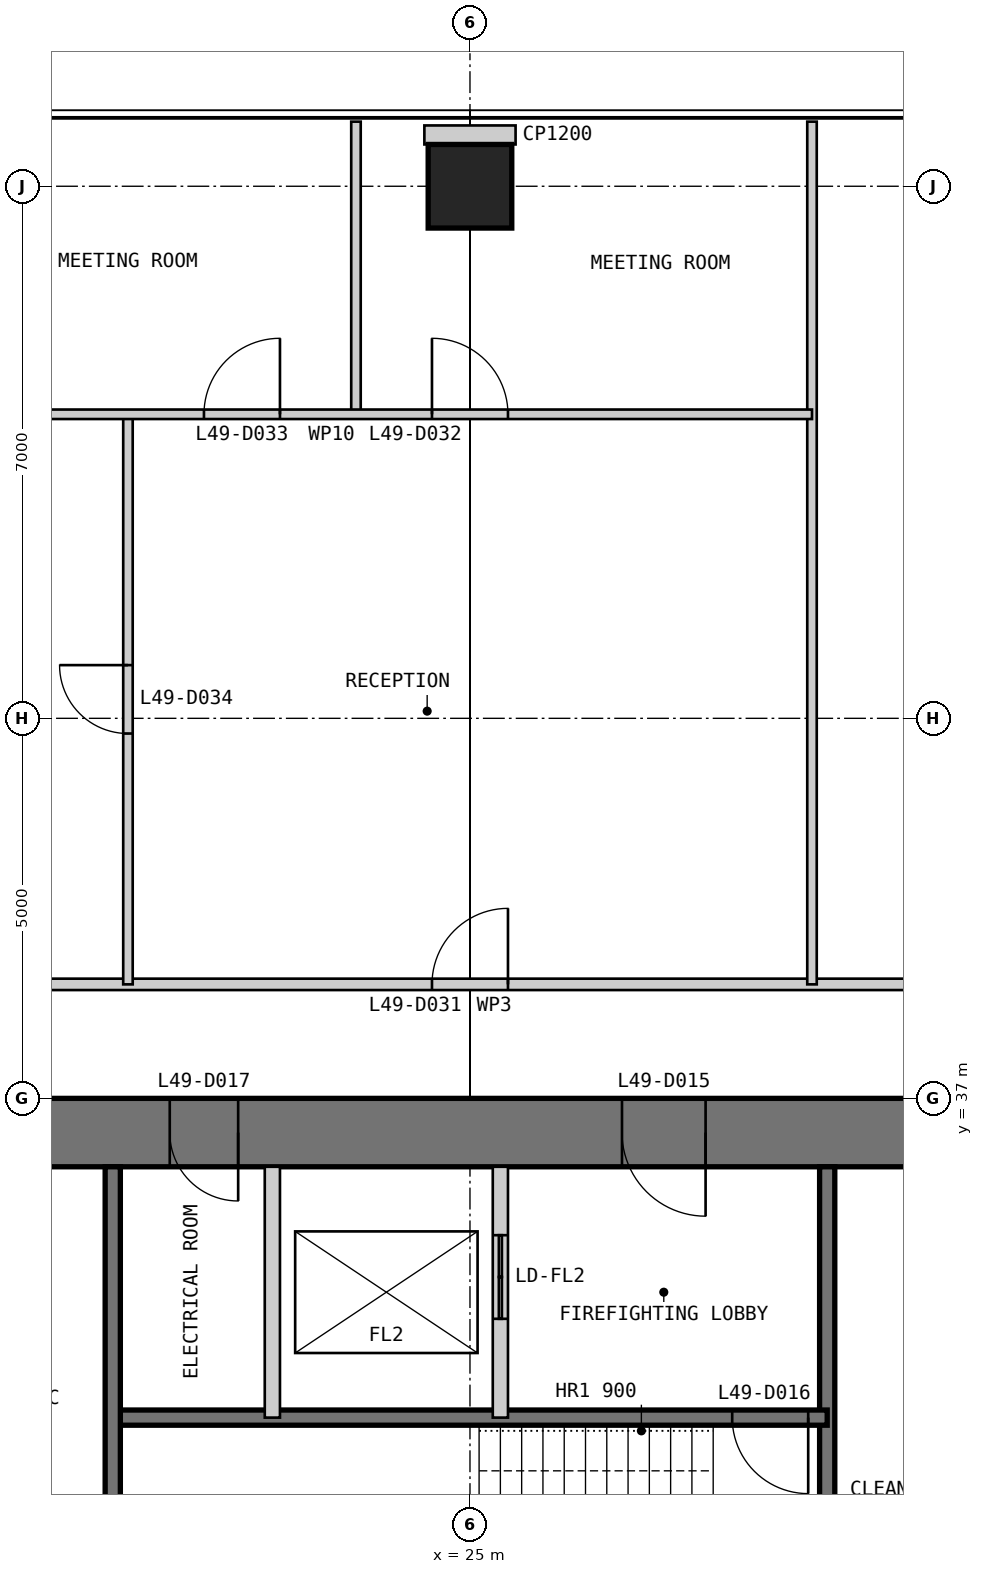
"""IFC4 building model, lengths in metres.
Left out: names, types, materials, properties, quantities, classifications, styles, units other than length and angle.
Written with IfcOpenShell. Run it as: python <this file> out.ifc"""

import sys

from ifc_helpers import new_model, si_unit, direction, frame, frame_2d, origin, origin_2d, place, context, subcontext, project, spatial, polyline, rectangle, outline, extrude, element, fill, save


model = new_model("IFC4")
c1 = context("Model", 3, precision=1e-05, world=origin(), true_north=direction((0.0, 1.0)))
c2 = subcontext(c1, "Body", "Model", "MODEL_VIEW")
j1 = project(units=[si_unit("LENGTHUNIT", "METRE"), si_unit("PLANEANGLEUNIT", "RADIAN")], contexts=[c1])
p1 = place(None, origin())
s1 = spatial("IfcSite", under=j1, at=p1, CompositionType="ELEMENT")
p2 = place(p1, origin())
s2 = spatial("IfcBuilding", under=s1, at=p2, CompositionType="ELEMENT")
p3 = place(p2, frame((0.0, 0.0, 209.8)))
s3 = spatial("IfcBuildingStorey", under=s2, at=p3, CompositionType="ELEMENT", Elevation=209.8)
p4 = place(p3, frame((25.0, 49.0, 0.0), z_axis=(0.0, 0.0, 1.0), x_axis=(1.0, 0.0, 0.0)))
e1 = element("IfcColumn", 1, at=p4, inside=s3, PredefinedType="COLUMN", context=c2, shape_type="SweptSolid", body=[
    extrude(rectangle(XDim=1.1, YDim=1.1, at=origin_2d()), origin(), (0.0, 0.0, 1.0), 4.0),
])
p5 = place(p3, frame((37.0, 36.55, 0.0), z_axis=(0.0, 0.0, 1.0), x_axis=(-1.0, 0.0, 0.0)))
e2 = element("IfcWall", 2, at=p5, inside=s3, PredefinedType="SHEAR", context=c2, shape_type="SweptSolid", body=[
    extrude(outline(polyline([(0.0, -0.45), (24.0, -0.45), (23.1, 0.45), (0.9, 0.45), (0.0, -0.45)])), origin(), (0.0, 0.0, 1.0), 4.0),
])
p6 = place(p5, frame((4.9, 0.0, 0.0)))
e3 = element("IfcOpeningElement", 3, at=p6, cuts=e2, PredefinedType="OPENING", context=c2, shape_type="SweptSolid", body=[
    extrude(rectangle(XDim=1.0, YDim=2.2, at=frame_2d((0.5, 1.1))), frame((0.0, 0.46, 0.0), z_axis=(0.0, -1.0, 0.0), x_axis=(1.0, 0.0, 0.0)), (0.0, 0.0, 1.0), 0.92),
])
p7 = place(p5, frame((8.9, 0.0, 0.0)))
e4 = element("IfcOpeningElement", 4, at=p7, cuts=e2, PredefinedType="OPENING", context=c2, shape_type="SweptSolid", body=[
    extrude(rectangle(XDim=1.1, YDim=2.2, at=frame_2d((0.55, 1.1))), frame((0.0, 0.46, 0.0), z_axis=(0.0, -1.0, 0.0), x_axis=(1.0, 0.0, 0.0)), (0.0, 0.0, 1.0), 0.92),
])
p8 = place(p5, frame((15.05, 0.0, 0.0)))
e5 = element("IfcOpeningElement", 5, at=p8, cuts=e2, PredefinedType="OPENING", context=c2, shape_type="SweptSolid", body=[
    extrude(rectangle(XDim=0.9, YDim=2.2, at=frame_2d((0.45, 1.1))), frame((0.0, 0.46, 0.0), z_axis=(0.0, -1.0, 0.0), x_axis=(1.0, 0.0, 0.0)), (0.0, 0.0, 1.0), 0.92),
])
p9 = place(p5, frame((17.9, 0.0, 0.0)))
e6 = element("IfcOpeningElement", 6, at=p9, cuts=e2, PredefinedType="OPENING", context=c2, shape_type="SweptSolid", body=[
    extrude(rectangle(XDim=1.0, YDim=2.2, at=frame_2d((0.5, 1.1))), frame((0.0, 0.46, 0.0), z_axis=(0.0, -1.0, 0.0), x_axis=(1.0, 0.0, 0.0)), (0.0, 0.0, 1.0), 0.92),
])
p10 = place(p5, frame((21.4, 0.0, 0.0)))
e7 = element("IfcOpeningElement", 7, at=p10, cuts=e2, PredefinedType="OPENING", context=c2, shape_type="SweptSolid", body=[
    extrude(rectangle(XDim=1.0, YDim=2.2, at=frame_2d((0.5, 1.1))), frame((0.0, 0.46, 0.0), z_axis=(0.0, -1.0, 0.0), x_axis=(1.0, 0.0, 0.0)), (0.0, 0.0, 1.0), 0.92),
])
p11 = place(p3, frame((29.7, 36.1, 0.0), z_axis=(0.0, 0.0, 1.0), x_axis=(0.0, -1.0, 0.0)))
e8 = element("IfcWall", 8, at=p11, inside=s3, PredefinedType="SOLIDWALL", context=c2, shape_type="SweptSolid", body=[
    extrude(rectangle(XDim=16.1, YDim=0.2, at=frame_2d((8.05, 0.0))), origin(), (0.0, 0.0, 1.0), 3.8),
])
p12 = place(p11, frame((7.217, 0.0, 0.0)))
e9 = element("IfcOpeningElement", 9, at=p12, cuts=e8, PredefinedType="OPENING", context=c2, shape_type="SweptSolid", body=[
    extrude(rectangle(XDim=1.1, YDim=2.2, at=frame_2d((0.55, 1.1))), frame((0.0, 0.11, 0.0), z_axis=(0.0, -1.0, 0.0), x_axis=(1.0, 0.0, 0.0)), (0.0, 0.0, 1.0), 0.22),
])
p13 = place(p11, frame((10.55, 0.0, 0.0)))
e10 = element("IfcOpeningElement", 10, at=p13, cuts=e8, PredefinedType="OPENING", context=c2, shape_type="SweptSolid", body=[
    extrude(rectangle(XDim=1.1, YDim=2.2, at=frame_2d((0.55, 1.1))), frame((0.0, 0.11, 0.0), z_axis=(0.0, -1.0, 0.0), x_axis=(1.0, 0.0, 0.0)), (0.0, 0.0, 1.0), 0.22),
])
p14 = place(p11, frame((13.883, 0.0, 0.0)))
e11 = element("IfcOpeningElement", 11, at=p14, cuts=e8, PredefinedType="OPENING", context=c2, shape_type="SweptSolid", body=[
    extrude(rectangle(XDim=1.1, YDim=2.2, at=frame_2d((0.55, 1.1))), frame((0.0, 0.11, 0.0), z_axis=(0.0, -1.0, 0.0), x_axis=(1.0, 0.0, 0.0)), (0.0, 0.0, 1.0), 0.22),
])
p15 = place(p3, frame((29.7, 32.8, 0.0), z_axis=(0.0, 0.0, 1.0), x_axis=(-1.0, 0.0, 0.0)))
e12 = element("IfcWall", 12, at=p15, inside=s3, PredefinedType="SOLIDWALL", context=c2, shape_type="SweptSolid", body=[
    extrude(rectangle(XDim=9.4, YDim=0.2, at=frame_2d((4.7, 0.0))), origin(), (0.0, 0.0, 1.0), 3.8),
])
p16 = place(p15, frame((0.25, 0.0, 0.0)))
e13 = element("IfcOpeningElement", 13, at=p16, cuts=e12, PredefinedType="OPENING", context=c2, shape_type="SweptSolid", body=[
    extrude(rectangle(XDim=1.0, YDim=2.2, at=frame_2d((0.5, 1.1))), frame((0.0, 0.11, 0.0), z_axis=(0.0, -1.0, 0.0), x_axis=(1.0, 0.0, 0.0)), (0.0, 0.0, 1.0), 0.22),
])
p17 = place(p3, frame((25.4, 36.1, 0.0), z_axis=(0.0, 0.0, 1.0), x_axis=(0.0, -1.0, 0.0)))
e14 = element("IfcWall", 14, at=p17, inside=s3, PredefinedType="PARTITIONING", context=c2, shape_type="SweptSolid", body=[
    extrude(rectangle(XDim=3.3, YDim=0.2, at=frame_2d((1.65, 0.0))), origin(), (0.0, 0.0, 1.0), 3.8),
])
p18 = place(p17, frame((0.9, 0.0, 0.0)))
e15 = element("IfcOpeningElement", 15, at=p18, cuts=e14, PredefinedType="OPENING", context=c2, shape_type="SweptSolid", body=[
    extrude(rectangle(XDim=1.1, YDim=2.2, at=frame_2d((0.55, 1.1))), frame((0.0, 0.11, 0.0), z_axis=(0.0, -1.0, 0.0), x_axis=(1.0, 0.0, 0.0)), (0.0, 0.0, 1.0), 0.22),
])
p19 = place(p3, frame((22.4, 36.1, 0.0), z_axis=(0.0, 0.0, 1.0), x_axis=(0.0, -1.0, 0.0)))
e16 = element("IfcWall", 16, at=p19, inside=s3, PredefinedType="PARTITIONING", context=c2, shape_type="SweptSolid", body=[
    extrude(rectangle(XDim=3.3, YDim=0.2, at=frame_2d((1.65, 0.0))), origin(), (0.0, 0.0, 1.0), 3.8),
])
p20 = place(p3, frame((20.3, 36.1, 0.0), z_axis=(0.0, 0.0, 1.0), x_axis=(0.0, -1.0, 0.0)))
e17 = element("IfcWall", 17, at=p20, inside=s3, PredefinedType="SOLIDWALL", context=c2, shape_type="SweptSolid", body=[
    extrude(rectangle(XDim=6.1, YDim=0.2, at=frame_2d((3.05, 0.0))), origin(), (0.0, 0.0, 1.0), 3.8),
])
p21 = place(p3, frame((38.5, 38.5, 0.0), z_axis=(0.0, 0.0, 1.0), x_axis=(-1.0, 0.0, 0.0)))
e18 = element("IfcWall", 18, at=p21, inside=s3, PredefinedType="PARTITIONING", context=c2, shape_type="SweptSolid", body=[
    extrude(rectangle(XDim=27.0, YDim=0.15, at=frame_2d((13.5, 0.0))), origin(), (0.0, 0.0, 1.0), 3.85),
])
p22 = place(p21, frame((13.0, 0.0, 0.0)))
e19 = element("IfcOpeningElement", 19, at=p22, cuts=e18, PredefinedType="OPENING", context=c2, shape_type="SweptSolid", body=[
    extrude(rectangle(XDim=1.0, YDim=2.2, at=frame_2d((0.5, 1.1))), frame((0.0, 0.085, 0.0), z_axis=(0.0, -1.0, 0.0), x_axis=(1.0, 0.0, 0.0)), (0.0, 0.0, 1.0), 0.17),
])
p23 = place(p21, frame((4.0, 0.0, 0.0)))
e20 = element("IfcOpeningElement", 20, at=p23, cuts=e18, PredefinedType="OPENING", context=c2, shape_type="SweptSolid", body=[
    extrude(rectangle(XDim=1.0, YDim=2.2, at=frame_2d((0.5, 1.1))), frame((0.0, 0.085, 0.0), z_axis=(0.0, -1.0, 0.0), x_axis=(1.0, 0.0, 0.0)), (0.0, 0.0, 1.0), 0.17),
])
p24 = place(p21, frame((22.0, 0.0, 0.0)))
e21 = element("IfcOpeningElement", 21, at=p24, cuts=e18, PredefinedType="OPENING", context=c2, shape_type="SweptSolid", body=[
    extrude(rectangle(XDim=1.0, YDim=2.2, at=frame_2d((0.5, 1.1))), frame((0.0, 0.085, 0.0), z_axis=(0.0, -1.0, 0.0), x_axis=(1.0, 0.0, 0.0)), (0.0, 0.0, 1.0), 0.17),
])
p25 = place(p21, frame((25.0, 0.0, 0.0)))
e22 = element("IfcOpeningElement", 22, at=p25, cuts=e18, PredefinedType="OPENING", context=c2, shape_type="SweptSolid", body=[
    extrude(rectangle(XDim=1.0, YDim=2.2, at=frame_2d((0.5, 1.1))), frame((0.0, 0.085, 0.0), z_axis=(0.0, -1.0, 0.0), x_axis=(1.0, 0.0, 0.0)), (0.0, 0.0, 1.0), 0.17),
])
p26 = place(p3, frame((29.5, 49.85, 0.0), z_axis=(0.0, 0.0, 1.0), x_axis=(0.0, -1.0, 0.0)))
e23 = element("IfcWall", 23, at=p26, inside=s3, PredefinedType="PARTITIONING", context=c2, shape_type="SweptSolid", body=[
    extrude(rectangle(XDim=11.35, YDim=0.125, at=frame_2d((5.675, 0.0))), origin(), (0.0, 0.0, 1.0), 3.85),
])
p27 = place(p3, frame((23.5, 49.85, 0.0), z_axis=(0.0, 0.0, 1.0), x_axis=(0.0, -1.0, 0.0)))
e24 = element("IfcWall", 24, at=p27, inside=s3, PredefinedType="PARTITIONING", context=c2, shape_type="SweptSolid", body=[
    extrude(rectangle(XDim=3.85, YDim=0.125, at=frame_2d((1.925, 0.0))), origin(), (0.0, 0.0, 1.0), 3.85),
])
p28 = place(p3, frame((20.5, 46.0, 0.0), z_axis=(0.0, 0.0, 1.0), x_axis=(0.0, -1.0, 0.0)))
e25 = element("IfcWall", 25, at=p28, inside=s3, PredefinedType="PARTITIONING", context=c2, shape_type="SweptSolid", body=[
    extrude(rectangle(XDim=7.5, YDim=0.125, at=frame_2d((3.75, 0.0))), origin(), (0.0, 0.0, 1.0), 3.85),
])
p29 = place(p28, frame((3.3, 0.0, 0.0)))
e26 = element("IfcOpeningElement", 26, at=p29, cuts=e25, PredefinedType="OPENING", context=c2, shape_type="SweptSolid", body=[
    extrude(rectangle(XDim=0.9, YDim=2.2, at=frame_2d((0.45, 1.1))), frame((0.0, 0.073, 0.0), z_axis=(0.0, -1.0, 0.0), x_axis=(1.0, 0.0, 0.0)), (0.0, 0.0, 1.0), 0.145),
])
p30 = place(p3, frame((29.5, 46.0, 0.0), z_axis=(0.0, 0.0, 1.0), x_axis=(-1.0, 0.0, 0.0)))
e27 = element("IfcWall", 27, at=p30, inside=s3, PredefinedType="PARTITIONING", context=c2, shape_type="SweptSolid", body=[
    extrude(rectangle(XDim=12.0, YDim=0.125, at=frame_2d((6.0, 0.0))), origin(), (0.0, 0.0, 1.0), 3.85),
])
p31 = place(p30, frame((4.0, 0.0, 0.0)))
e28 = element("IfcOpeningElement", 28, at=p31, cuts=e27, PredefinedType="OPENING", context=c2, shape_type="SweptSolid", body=[
    extrude(rectangle(XDim=1.0, YDim=2.2, at=frame_2d((0.5, 1.1))), frame((0.0, 0.073, 0.0), z_axis=(0.0, -1.0, 0.0), x_axis=(1.0, 0.0, 0.0)), (0.0, 0.0, 1.0), 0.145),
])
p32 = place(p30, frame((7.0, 0.0, 0.0)))
e29 = element("IfcOpeningElement", 29, at=p32, cuts=e27, PredefinedType="OPENING", context=c2, shape_type="SweptSolid", body=[
    extrude(rectangle(XDim=1.0, YDim=2.2, at=frame_2d((0.5, 1.1))), frame((0.0, 0.073, 0.0), z_axis=(0.0, -1.0, 0.0), x_axis=(1.0, 0.0, 0.0)), (0.0, 0.0, 1.0), 0.145),
])
p33 = place(p3, frame((25.0, 49.8, 0.0), z_axis=(0.0, 0.0, 1.0), x_axis=(0.0, -1.0, 0.0)))
e30 = element("IfcWall", 30, at=p33, inside=s3, PredefinedType="PARTITIONING", context=c2, shape_type="SweptSolid", body=[
    extrude(rectangle(XDim=0.25, YDim=1.2, at=frame_2d((0.125, 0.0))), origin(), (0.0, 0.0, 1.0), 3.85),
])
p34 = place(p7, origin())
e31 = element("IfcDoor", 31, at=p34, inside=s3, OperationType="SINGLE_SWING_LEFT", PredefinedType="DOOR", context=c2, shape_type="SweptSolid", body=[
    extrude(rectangle(XDim=1.1, YDim=2.2, at=frame_2d((0.55, 1.1))), frame((0.0, 0.025, 0.0), z_axis=(0.0, -1.0, 0.0), x_axis=(1.0, 0.0, 0.0)), (0.0, 0.0, 1.0), 0.05),
    extrude(outline(polyline([(0.0, 0.0), (0.04, 0.0), (0.04, 2.16), (1.06, 2.16), (1.06, 0.0), (1.1, 0.0), (1.1, 2.2), (0.0, 2.2), (0.0, 0.0)])), frame((0.0, 0.3, 0.0), z_axis=(0.0, -1.0, 0.0), x_axis=(1.0, 0.0, 0.0)), (0.0, 0.0, 1.0), 0.6),
])
fill(e4, e31)
p35 = place(p16, origin())
e32 = element("IfcDoor", 32, at=p35, inside=s3, OperationType="SINGLE_SWING_LEFT", PredefinedType="DOOR", context=c2, shape_type="SweptSolid", body=[
    extrude(rectangle(XDim=1.0, YDim=2.2, at=frame_2d((0.5, 1.1))), frame((0.0, 0.025, 0.0), z_axis=(0.0, -1.0, 0.0), x_axis=(1.0, 0.0, 0.0)), (0.0, 0.0, 1.0), 0.05),
])
fill(e13, e32)
p36 = place(p8, origin())
e33 = element("IfcDoor", 33, at=p36, inside=s3, OperationType="SINGLE_SWING_LEFT", PredefinedType="DOOR", context=c2, shape_type="SweptSolid", body=[
    extrude(rectangle(XDim=0.9, YDim=2.2, at=frame_2d((0.45, 1.1))), frame((0.0, 0.025, 0.0), z_axis=(0.0, -1.0, 0.0), x_axis=(1.0, 0.0, 0.0)), (0.0, 0.0, 1.0), 0.05),
    extrude(outline(polyline([(0.0, 0.0), (0.04, 0.0), (0.04, 2.16), (0.86, 2.16), (0.86, 0.0), (0.9, 0.0), (0.9, 2.2), (0.0, 2.2), (0.0, 0.0)])), frame((0.0, 0.3, 0.0), z_axis=(0.0, -1.0, 0.0), x_axis=(1.0, 0.0, 0.0)), (0.0, 0.0, 1.0), 0.6),
])
fill(e5, e33)
p37 = place(p22, frame((1.0, 0.0, 0.0), z_axis=(0.0, 0.0, 1.0), x_axis=(-1.0, 0.0, 0.0)))
e34 = element("IfcDoor", 34, at=p37, inside=s3, OperationType="SINGLE_SWING_RIGHT", PredefinedType="DOOR", context=c2, shape_type="SweptSolid", body=[
    extrude(rectangle(XDim=1.0, YDim=2.2, at=frame_2d((0.5, 1.1))), frame((0.0, 0.025, 0.0), z_axis=(0.0, -1.0, 0.0), x_axis=(1.0, 0.0, 0.0)), (0.0, 0.0, 1.0), 0.05),
])
fill(e19, e34)
p38 = place(p31, frame((1.0, 0.0, 0.0), z_axis=(0.0, 0.0, 1.0), x_axis=(-1.0, 0.0, 0.0)))
e35 = element("IfcDoor", 35, at=p38, inside=s3, OperationType="SINGLE_SWING_LEFT", PredefinedType="DOOR", context=c2, shape_type="SweptSolid", body=[
    extrude(rectangle(XDim=1.0, YDim=2.2, at=frame_2d((0.5, 1.1))), frame((0.0, 0.025, 0.0), z_axis=(0.0, -1.0, 0.0), x_axis=(1.0, 0.0, 0.0)), (0.0, 0.0, 1.0), 0.05),
])
fill(e28, e35)
p39 = place(p32, frame((1.0, 0.0, 0.0), z_axis=(0.0, 0.0, 1.0), x_axis=(-1.0, 0.0, 0.0)))
e36 = element("IfcDoor", 36, at=p39, inside=s3, OperationType="SINGLE_SWING_RIGHT", PredefinedType="DOOR", context=c2, shape_type="SweptSolid", body=[
    extrude(rectangle(XDim=1.0, YDim=2.2, at=frame_2d((0.5, 1.1))), frame((0.0, 0.025, 0.0), z_axis=(0.0, -1.0, 0.0), x_axis=(1.0, 0.0, 0.0)), (0.0, 0.0, 1.0), 0.05),
])
fill(e29, e36)
p40 = place(p29, frame((0.9, 0.0, 0.0), z_axis=(0.0, 0.0, 1.0), x_axis=(-1.0, 0.0, 0.0)))
e37 = element("IfcDoor", 37, at=p40, inside=s3, OperationType="SINGLE_SWING_RIGHT", PredefinedType="DOOR", context=c2, shape_type="SweptSolid", body=[
    extrude(rectangle(XDim=0.9, YDim=2.2, at=frame_2d((0.45, 1.1))), frame((0.0, 0.025, 0.0), z_axis=(0.0, -1.0, 0.0), x_axis=(1.0, 0.0, 0.0)), (0.0, 0.0, 1.0), 0.05),
])
fill(e26, e37)
p41 = place(p18, origin())
e38 = element("IfcDoor", 38, at=p41, inside=s3, OperationType="DOUBLE_DOOR_SLIDING", PredefinedType="DOOR", context=c2, shape_type="SweptSolid", body=[
    extrude(rectangle(XDim=1.1, YDim=2.2, at=frame_2d((0.55, 1.1))), frame((0.0, 0.025, 0.0), z_axis=(0.0, -1.0, 0.0), x_axis=(1.0, 0.0, 0.0)), (0.0, 0.0, 1.0), 0.05),
])
fill(e15, e38)
save(model, sys.argv[1])
